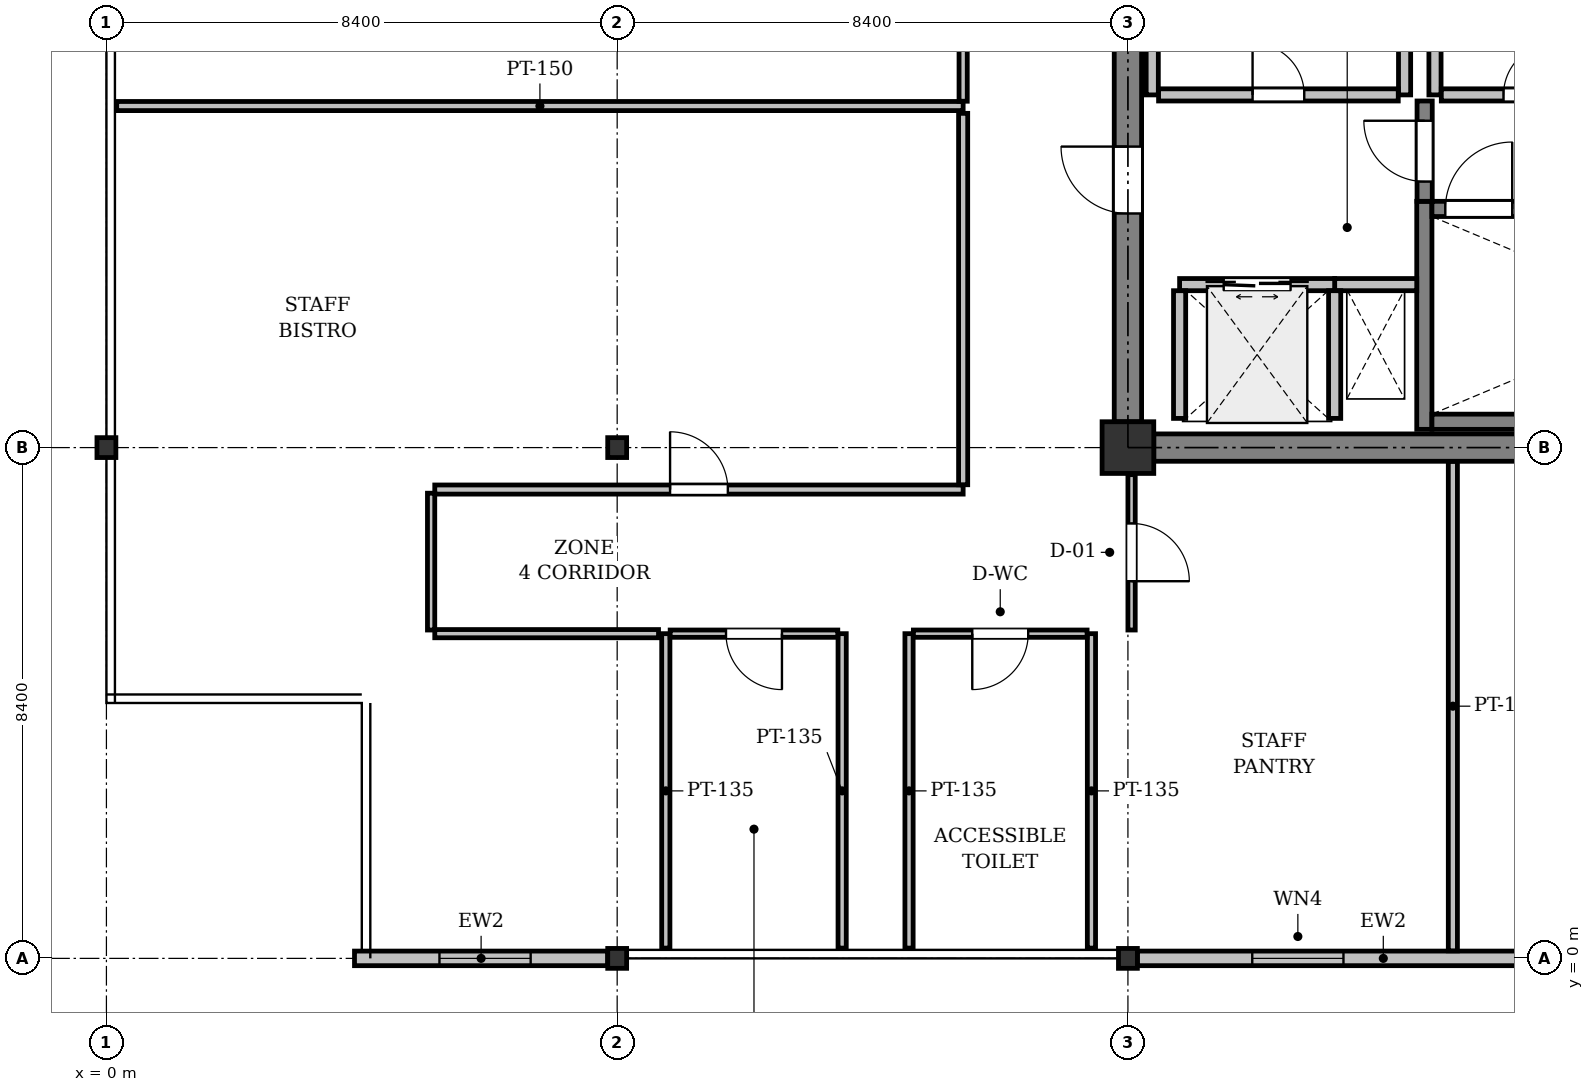
"""IFC4 building model, lengths in metres.
Left out: names, types, materials, properties, quantities, classifications, styles, units other than length and angle.
Written with IfcOpenShell. Run it as: python <this file> out.ifc"""

import sys

from ifc_helpers import new_model, si_unit, direction, frame, frame_2d, origin, origin_2d, place, context, subcontext, project, spatial, rectangle, i_section, extrude, element, fill, save


model = new_model("IFC4")
c1 = context("Model", 3, precision=1e-05, world=origin(), true_north=direction((0.0, 1.0)))
c2 = subcontext(c1, "Body", "Model", "MODEL_VIEW")
j1 = project(units=[si_unit("LENGTHUNIT", "METRE"), si_unit("PLANEANGLEUNIT", "RADIAN")], contexts=[c1])
p1 = place(None, origin())
s1 = spatial("IfcSite", under=j1, at=p1, CompositionType="ELEMENT")
p2 = place(p1, origin())
s2 = spatial("IfcBuilding", under=s1, at=p2, CompositionType="ELEMENT")
p3 = place(p2, frame((0.0, 0.0, 290.2)))
s3 = spatial("IfcBuildingStorey", under=s2, at=p3, CompositionType="ELEMENT", Elevation=290.2)
for number, where, z_axis, x_axis in (
    (1, (0.0, 8.4, 0.0), (0.0, 0.0, 1.0), (1.0, 0.0, 0.0)),
    (2, (8.4, 0.0, 0.0), (0.0, 0.0, 1.0), (1.0, 0.0, 0.0)),
    (3, (8.4, 8.4, 0.0), (0.0, 0.0, 1.0), (1.0, 0.0, 0.0)),
    (4, (16.8, 0.0, 0.0), (0.0, 0.0, 1.0), (1.0, 0.0, 0.0)),
):
    element("IfcColumn", number, at=place(p3, frame(where, z_axis=z_axis, x_axis=x_axis)), inside=s3, PredefinedType="COLUMN", context=c2, shape_type="SweptSolid", body=[
        extrude(i_section(OverallWidth=0.311, OverallDepth=0.327, WebThickness=0.016, FlangeThickness=0.025, FilletRadius=0.017, at=origin_2d()), origin(), (0.0, 0.0, 1.0), 4.0),
    ])
p4 = place(p3, frame((16.8, 8.4, 0.0), z_axis=(0.0, 0.0, 1.0), x_axis=(1.0, 0.0, 0.0)))
e5 = element("IfcColumn", 5, at=p4, inside=s3, PredefinedType="COLUMN", context=c2, shape_type="SweptSolid", body=[
    extrude(rectangle(XDim=0.85, YDim=0.85, at=origin_2d()), origin(), (0.0, 0.0, 1.0), 4.0),
])
p5 = place(p3, frame((25.044, 0.0, 0.0), z_axis=(0.0, 0.0, 1.0), x_axis=(-1.0, 0.0, 0.0)))
e6 = element("IfcWall", 6, at=p5, inside=s3, PredefinedType="STANDARD", context=c2, shape_type="SweptSolid", body=[
    extrude(rectangle(XDim=8.089, YDim=0.24, at=frame_2d((4.044, 0.0))), origin(), (0.0, 0.0, 1.0), 3.475),
])
p6 = place(p5, frame((4.7, 0.0, 0.9)))
e7 = element("IfcOpeningElement", 7, at=p6, cuts=e6, PredefinedType="OPENING", context=c2, shape_type="SweptSolid", body=[
    extrude(rectangle(XDim=1.5, YDim=1.6, at=frame_2d((0.75, 0.8))), frame((0.0, 0.13, 0.0), z_axis=(0.0, -1.0, 0.0), x_axis=(1.0, 0.0, 0.0)), (0.0, 0.0, 1.0), 0.26),
])
p7 = place(p3, frame((8.244, 0.0, 0.0), z_axis=(0.0, 0.0, 1.0), x_axis=(-1.0, 0.0, 0.0)))
e8 = element("IfcWall", 8, at=p7, inside=s3, PredefinedType="STANDARD", context=c2, shape_type="SweptSolid", body=[
    extrude(rectangle(XDim=4.164, YDim=0.24, at=frame_2d((2.082, 0.0))), origin(), (0.0, 0.0, 1.0), 3.725),
])
p8 = place(p7, frame((1.267, 0.0, 0.9)))
e9 = element("IfcOpeningElement", 9, at=p8, cuts=e8, PredefinedType="OPENING", context=c2, shape_type="SweptSolid", body=[
    extrude(rectangle(XDim=1.5, YDim=1.6, at=frame_2d((0.75, 0.8))), frame((0.0, 0.13, 0.0), z_axis=(0.0, -1.0, 0.0), x_axis=(1.0, 0.0, 0.0)), (0.0, 0.0, 1.0), 0.26),
])
p9 = place(p3, frame((17.225, 8.4, 0.0), z_axis=(0.0, 0.0, 1.0), x_axis=(1.0, 0.0, 0.0)))
e10 = element("IfcWall", 10, at=p9, inside=s3, PredefinedType="SHEAR", context=c2, shape_type="SweptSolid", body=[
    extrude(rectangle(XDim=7.55, YDim=0.45, at=frame_2d((3.775, 0.0))), origin(), (0.0, 0.0, 1.0), 3.725),
])
p10 = place(p3, frame((16.8, 8.825, 0.0), z_axis=(0.0, 0.0, 1.0), x_axis=(0.0, 1.0, 0.0)))
e11 = element("IfcWall", 11, at=p10, inside=s3, PredefinedType="SHEAR", context=c2, shape_type="SweptSolid", body=[
    extrude(rectangle(XDim=7.55, YDim=0.45, at=frame_2d((3.775, 0.0))), origin(), (0.0, 0.0, 1.0), 3.725),
])
p11 = place(p10, frame((3.425, 0.0, 0.0)))
e12 = element("IfcOpeningElement", 12, at=p11, cuts=e11, PredefinedType="OPENING", context=c2, shape_type="SweptSolid", body=[
    extrude(rectangle(XDim=1.1, YDim=2.15, at=frame_2d((0.55, 1.075))), frame((0.0, 0.235, 0.0), z_axis=(0.0, -1.0, 0.0), x_axis=(1.0, 0.0, 0.0)), (0.0, 0.0, 1.0), 0.47),
])
p12 = place(p3, frame((21.675, 8.7, 0.0), z_axis=(0.0, 0.0, 1.0), x_axis=(0.0, 1.0, 0.0)))
e13 = element("IfcWall", 13, at=p12, inside=s3, PredefinedType="SHEAR", context=c2, shape_type="SweptSolid", body=[
    extrude(rectangle(XDim=3.75, YDim=0.25, at=frame_2d((1.875, 0.0))), origin(), (0.0, 0.0, 1.0), 3.725),
])
p13 = place(p3, frame((21.8, 8.825, 0.0), z_axis=(0.0, 0.0, 1.0), x_axis=(1.0, 0.0, 0.0)))
e14 = element("IfcWall", 14, at=p13, inside=s3, PredefinedType="SHEAR", context=c2, shape_type="SweptSolid", body=[
    extrude(rectangle(XDim=7.75, YDim=0.25, at=frame_2d((3.875, 0.0))), origin(), (0.0, 0.0, 1.0), 3.725),
])
p14 = place(p3, frame((21.8, 12.325, 0.0), z_axis=(0.0, 0.0, 1.0), x_axis=(1.0, 0.0, 0.0)))
e15 = element("IfcWall", 15, at=p14, inside=s3, PredefinedType="SHEAR", context=c2, shape_type="SweptSolid", body=[
    extrude(rectangle(XDim=7.75, YDim=0.25, at=frame_2d((3.875, 0.0))), origin(), (0.0, 0.0, 1.0), 3.725),
])
p15 = place(p14, frame((0.22, 0.0, 0.0)))
e16 = element("IfcOpeningElement", 16, at=p15, cuts=e15, PredefinedType="OPENING", context=c2, shape_type="SweptSolid", body=[
    extrude(rectangle(XDim=1.1, YDim=2.15, at=frame_2d((0.55, 1.075))), frame((0.0, 0.135, 0.0), z_axis=(0.0, -1.0, 0.0), x_axis=(1.0, 0.0, 0.0)), (0.0, 0.0, 1.0), 0.27),
])
p16 = place(p3, frame((20.2, 11.08, 0.0), z_axis=(0.0, 0.0, 1.0), x_axis=(1.0, 0.0, 0.0)))
e17 = element("IfcWall", 17, at=p16, inside=s3, PredefinedType="PARTITIONING", context=c2, shape_type="SweptSolid", body=[
    extrude(rectangle(XDim=1.35, YDim=0.2, at=frame_2d((0.675, 0.0))), origin(), (0.0, 0.0, 1.0), 3.725),
])
p17 = place(p3, frame((21.68, 12.45, 0.0), z_axis=(0.0, 0.0, 1.0), x_axis=(0.0, 1.0, 0.0)))
e18 = element("IfcWall", 18, at=p17, inside=s3, PredefinedType="SHEAR", context=c2, shape_type="SweptSolid", body=[
    extrude(rectangle(XDim=1.65, YDim=0.25, at=frame_2d((0.825, 0.0))), origin(), (0.0, 0.0, 1.0), 3.725),
])
p18 = place(p17, frame((0.325, 0.0, 0.0)))
e19 = element("IfcOpeningElement", 19, at=p18, cuts=e18, PredefinedType="OPENING", context=c2, shape_type="SweptSolid", body=[
    extrude(rectangle(XDim=1.0, YDim=2.15, at=frame_2d((0.5, 1.075))), frame((0.0, 0.135, 0.0), z_axis=(0.0, -1.0, 0.0), x_axis=(1.0, 0.0, 0.0)), (0.0, 0.0, 1.0), 0.27),
])
p19 = place(p3, frame((17.65, 11.08, 0.0), z_axis=(0.0, 0.0, 1.0), x_axis=(1.0, 0.0, 0.0)))
e20 = element("IfcWall", 20, at=p19, inside=s3, PredefinedType="PARTITIONING", context=c2, shape_type="SweptSolid", body=[
    extrude(rectangle(XDim=2.55, YDim=0.2, at=frame_2d((1.275, 0.0))), origin(), (0.0, 0.0, 1.0), 3.725),
])
p20 = place(p19, frame((0.725, 0.0, 0.0)))
e21 = element("IfcOpeningElement", 21, at=p20, cuts=e20, PredefinedType="OPENING", context=c2, shape_type="SweptSolid", body=[
    extrude(rectangle(XDim=1.1, YDim=2.2, at=frame_2d((0.55, 1.1))), frame((0.0, 0.11, 0.0), z_axis=(0.0, -1.0, 0.0), x_axis=(1.0, 0.0, 0.0)), (0.0, 0.0, 1.0), 0.22),
])
for number, where, z_axis, x_axis in (
    (22, (20.2, 8.88, 0.0), (0.0, 0.0, 1.0), (0.0, 1.0, 0.0)),
    (23, (17.65, 8.88, 0.0), (0.0, 0.0, 1.0), (0.0, 1.0, 0.0)),
):
    element("IfcWall", number, at=place(p3, frame(where, z_axis=z_axis, x_axis=x_axis)), inside=s3, PredefinedType="PARTITIONING", context=c2, shape_type="SweptSolid", body=[
        extrude(rectangle(XDim=2.1, YDim=0.2, at=frame_2d((1.05, 0.0))), origin(), (0.0, 0.0, 1.0), 3.725),
    ])
p21 = place(p3, frame((21.35, 14.2, 0.0), z_axis=(0.0, 0.0, 1.0), x_axis=(0.0, 1.0, 0.0)))
e24 = element("IfcWall", 24, at=p21, inside=s3, PredefinedType="PARTITIONING", context=c2, shape_type="SweptSolid", body=[
    extrude(rectangle(XDim=2.25, YDim=0.2, at=frame_2d((1.125, 0.0))), origin(), (0.0, 0.0, 1.0), 3.725),
])
p22 = place(p3, frame((17.2, 16.37, 0.0), z_axis=(0.0, 0.0, 1.0), x_axis=(0.0, -1.0, 0.0)))
e25 = element("IfcWall", 25, at=p22, inside=s3, PredefinedType="PARTITIONING", context=c2, shape_type="SweptSolid", body=[
    extrude(rectangle(XDim=2.17, YDim=0.2, at=frame_2d((1.085, 0.0))), origin(), (0.0, 0.0, 1.0), 3.725),
])
p23 = place(p3, frame((17.304, 14.2, 0.0), z_axis=(0.0, 0.0, 1.0), x_axis=(1.0, 0.0, 0.0)))
e26 = element("IfcWall", 26, at=p23, inside=s3, PredefinedType="PARTITIONING", context=c2, shape_type="SweptSolid", body=[
    extrude(rectangle(XDim=3.942, YDim=0.2, at=frame_2d((1.971, 0.0))), origin(), (0.0, 0.0, 1.0), 3.725),
])
p24 = place(p23, frame((1.546, 0.0, 0.0)))
e27 = element("IfcOpeningElement", 27, at=p24, cuts=e26, PredefinedType="OPENING", context=c2, shape_type="SweptSolid", body=[
    extrude(rectangle(XDim=0.85, YDim=2.15, at=frame_2d((0.425, 1.075))), frame((0.0, 0.11, 0.0), z_axis=(0.0, -1.0, 0.0), x_axis=(1.0, 0.0, 0.0)), (0.0, 0.0, 1.0), 0.22),
])
p25 = place(p3, frame((21.85, 16.346, 0.0), z_axis=(0.0, 0.0, 1.0), x_axis=(0.0, -1.0, 0.0)))
e28 = element("IfcWall", 28, at=p25, inside=s3, PredefinedType="PARTITIONING", context=c2, shape_type="SweptSolid", body=[
    extrude(rectangle(XDim=2.146, YDim=0.2, at=frame_2d((1.073, 0.0))), origin(), (0.0, 0.0, 1.0), 3.725),
])
p26 = place(p3, frame((21.954, 14.2, 0.0), z_axis=(0.0, 0.0, 1.0), x_axis=(1.0, 0.0, 0.0)))
e29 = element("IfcWall", 29, at=p26, inside=s3, PredefinedType="PARTITIONING", context=c2, shape_type="SweptSolid", body=[
    extrude(rectangle(XDim=2.896, YDim=0.2, at=frame_2d((1.448, 0.0))), origin(), (0.0, 0.0, 1.0), 3.725),
])
p27 = place(p26, frame((1.023, 0.0, 0.0)))
e30 = element("IfcOpeningElement", 30, at=p27, cuts=e29, PredefinedType="OPENING", context=c2, shape_type="SweptSolid", body=[
    extrude(rectangle(XDim=0.85, YDim=2.15, at=frame_2d((0.425, 1.075))), frame((0.0, 0.11, 0.0), z_axis=(0.0, -1.0, 0.0), x_axis=(1.0, 0.0, 0.0)), (0.0, 0.0, 1.0), 0.22),
])
for number, where, z_axis, x_axis in (
    (31, (13.2, 5.34, 0.0), (0.0, 0.0, 1.0), (0.0, -1.0, 0.0)),
    (32, (16.2, 0.169, 0.0), (0.0, 0.0, 1.0), (0.0, 1.0, 0.0)),
):
    element("IfcWall", number, at=place(p3, frame(where, z_axis=z_axis, x_axis=x_axis)), inside=s3, PredefinedType="PARTITIONING", context=c2, shape_type="SweptSolid", body=[
        extrude(rectangle(XDim=5.171, YDim=0.135, at=frame_2d((2.585, 0.0))), origin(), (0.0, 0.0, 1.0), 3.725),
    ])
p28 = place(p3, frame((16.128, 5.34, 0.0), z_axis=(0.0, 0.0, 1.0), x_axis=(-1.0, 0.0, 0.0)))
e33 = element("IfcWall", 33, at=p28, inside=s3, PredefinedType="PARTITIONING", context=c2, shape_type="SweptSolid", body=[
    extrude(rectangle(XDim=2.857, YDim=0.12, at=frame_2d((1.428, 0.0))), origin(), (0.0, 0.0, 1.0), 3.725),
])
p29 = place(p28, frame((0.969, 0.0, 0.0)))
e34 = element("IfcOpeningElement", 34, at=p29, cuts=e33, PredefinedType="OPENING", context=c2, shape_type="SweptSolid", body=[
    extrude(rectangle(XDim=0.92, YDim=2.1, at=frame_2d((0.46, 1.05))), frame((0.0, 0.07, 0.0), z_axis=(0.0, -1.0, 0.0), x_axis=(1.0, 0.0, 0.0)), (0.0, 0.0, 1.0), 0.14),
])
for number, where, z_axis, x_axis in (
    (35, (9.2, 5.34, 0.0), (0.0, 0.0, 1.0), (0.0, -1.0, 0.0)),
    (36, (12.1, 0.169, 0.0), (0.0, 0.0, 1.0), (0.0, 1.0, 0.0)),
):
    element("IfcWall", number, at=place(p3, frame(where, z_axis=z_axis, x_axis=x_axis)), inside=s3, PredefinedType="PARTITIONING", context=c2, shape_type="SweptSolid", body=[
        extrude(rectangle(XDim=5.171, YDim=0.135, at=frame_2d((2.585, 0.0))), origin(), (0.0, 0.0, 1.0), 3.725),
    ])
p30 = place(p3, frame((12.029, 5.34, 0.0), z_axis=(0.0, 0.0, 1.0), x_axis=(-1.0, 0.0, 0.0)))
e37 = element("IfcWall", 37, at=p30, inside=s3, PredefinedType="PARTITIONING", context=c2, shape_type="SweptSolid", body=[
    extrude(rectangle(XDim=2.757, YDim=0.12, at=frame_2d((1.378, 0.0))), origin(), (0.0, 0.0, 1.0), 3.725),
])
p31 = place(p30, frame((0.918, 0.0, 0.0)))
e38 = element("IfcOpeningElement", 38, at=p31, cuts=e37, PredefinedType="OPENING", context=c2, shape_type="SweptSolid", body=[
    extrude(rectangle(XDim=0.92, YDim=2.1, at=frame_2d((0.46, 1.05))), frame((0.0, 0.07, 0.0), z_axis=(0.0, -1.0, 0.0), x_axis=(1.0, 0.0, 0.0)), (0.0, 0.0, 1.0), 0.14),
])
p32 = place(p3, frame((22.144, 0.124, 0.0), z_axis=(0.0, 0.0, 1.0), x_axis=(0.0, 1.0, 0.0)))
e39 = element("IfcWall", 39, at=p32, inside=s3, PredefinedType="PARTITIONING", context=c2, shape_type="SweptSolid", body=[
    extrude(rectangle(XDim=8.047, YDim=0.15, at=frame_2d((4.023, 0.0))), origin(), (0.0, 0.0, 1.0), 3.725),
])
p33 = place(p3, frame((16.86, 7.955, 0.0), z_axis=(0.0, 0.0, 1.0), x_axis=(0.0, -1.0, 0.0)))
e40 = element("IfcWall", 40, at=p33, inside=s3, PredefinedType="PARTITIONING", context=c2, shape_type="SweptSolid", body=[
    extrude(rectangle(XDim=2.555, YDim=0.12, at=frame_2d((1.278, 0.0))), origin(), (0.0, 0.0, 1.0), 3.319),
])
p34 = place(p33, frame((0.802, 0.0, 0.0)))
e41 = element("IfcOpeningElement", 41, at=p34, cuts=e40, PredefinedType="OPENING", context=c2, shape_type="SweptSolid", body=[
    extrude(rectangle(XDim=0.95, YDim=2.15, at=frame_2d((0.475, 1.075))), frame((0.0, 0.07, 0.0), z_axis=(0.0, -1.0, 0.0), x_axis=(1.0, 0.0, 0.0)), (0.0, 0.0, 1.0), 0.14),
])
p35 = place(p3, frame((0.169, 14.017, 0.0), z_axis=(0.0, 0.0, 1.0), x_axis=(1.0, 0.0, 0.0)))
e42 = element("IfcWall", 42, at=p35, inside=s3, PredefinedType="PARTITIONING", context=c2, shape_type="SweptSolid", body=[
    extrude(rectangle(XDim=13.921, YDim=0.15, at=frame_2d((6.96, 0.0))), origin(), (0.0, 0.0, 1.0), 3.319),
])
p36 = place(p3, frame((14.09, 14.096, 0.0), z_axis=(0.0, 0.0, 1.0), x_axis=(0.0, 1.0, 0.0)))
e43 = element("IfcWall", 43, at=p36, inside=s3, PredefinedType="PARTITIONING", context=c2, shape_type="SweptSolid", body=[
    extrude(rectangle(XDim=4.303, YDim=0.135, at=frame_2d((2.152, 0.0))), origin(), (0.0, 0.0, 1.0), 3.271),
])
p37 = place(p36, frame((1.677, 0.0, 0.0)))
e44 = element("IfcOpeningElement", 44, at=p37, cuts=e43, PredefinedType="OPENING", context=c2, shape_type="SweptSolid", body=[
    extrude(rectangle(XDim=0.95, YDim=2.15, at=frame_2d((0.475, 1.075))), frame((0.0, 0.077, 0.0), z_axis=(0.0, -1.0, 0.0), x_axis=(1.0, 0.0, 0.0)), (0.0, 0.0, 1.0), 0.155),
])
p38 = place(p3, frame((5.4, 7.71, 0.0), z_axis=(0.0, 0.0, 1.0), x_axis=(1.0, 0.0, 0.0)))
e45 = element("IfcWall", 45, at=p38, inside=s3, PredefinedType="PARTITIONING", context=c2, shape_type="SweptSolid", body=[
    extrude(rectangle(XDim=8.69, YDim=0.15, at=frame_2d((4.345, 0.0))), origin(), (0.0, 0.0, 1.0), 3.319),
])
p39 = place(p38, frame((3.87, 0.0, 0.0)))
e46 = element("IfcOpeningElement", 46, at=p39, cuts=e45, PredefinedType="OPENING", context=c2, shape_type="SweptSolid", body=[
    extrude(rectangle(XDim=0.95, YDim=2.15, at=frame_2d((0.475, 1.075))), frame((0.0, 0.085, 0.0), z_axis=(0.0, -1.0, 0.0), x_axis=(1.0, 0.0, 0.0)), (0.0, 0.0, 1.0), 0.17),
])
p40 = place(p3, frame((14.09, 7.789, 0.0), z_axis=(0.0, 0.0, 1.0), x_axis=(0.0, 1.0, 0.0)))
e47 = element("IfcWall", 47, at=p40, inside=s3, PredefinedType="PARTITIONING", context=c2, shape_type="SweptSolid", body=[
    extrude(rectangle(XDim=6.108, YDim=0.15, at=frame_2d((3.054, 0.0))), origin(), (0.0, 0.0, 1.0), 3.271),
])
p41 = place(p3, frame((9.08, 5.34, 0.0), z_axis=(0.0, 0.0, 1.0), x_axis=(-1.0, 0.0, 0.0)))
e48 = element("IfcWall", 48, at=p41, inside=s3, PredefinedType="PARTITIONING", context=c2, shape_type="SweptSolid", body=[
    extrude(rectangle(XDim=3.68, YDim=0.135, at=frame_2d((1.84, 0.0))), origin(), (0.0, 0.0, 1.0), 3.319),
])
p42 = place(p3, frame((5.34, 5.4, 0.0), z_axis=(0.0, 0.0, 1.0), x_axis=(0.0, 1.0, 0.0)))
e49 = element("IfcWall", 49, at=p42, inside=s3, PredefinedType="PARTITIONING", context=c2, shape_type="SweptSolid", body=[
    extrude(rectangle(XDim=2.25, YDim=0.12, at=frame_2d((1.125, 0.0))), origin(), (0.0, 0.0, 1.0), 3.725),
])
p43 = place(p6, origin())
e50 = element("IfcWindow", 50, at=p43, inside=s3, PartitioningType="SINGLE_PANEL", PredefinedType="WINDOW", context=c2, shape_type="SweptSolid", body=[
    extrude(rectangle(XDim=1.5, YDim=1.6, at=frame_2d((0.75, 0.8))), frame((0.0, 0.03, 0.0), z_axis=(0.0, -1.0, 0.0), x_axis=(1.0, 0.0, 0.0)), (0.0, 0.0, 1.0), 0.06),
])
fill(e7, e50)
p44 = place(p8, origin())
e51 = element("IfcWindow", 51, at=p44, inside=s3, PartitioningType="SINGLE_PANEL", PredefinedType="WINDOW", context=c2, shape_type="SweptSolid", body=[
    extrude(rectangle(XDim=1.5, YDim=1.6, at=frame_2d((0.75, 0.8))), frame((0.0, 0.03, 0.0), z_axis=(0.0, -1.0, 0.0), x_axis=(1.0, 0.0, 0.0)), (0.0, 0.0, 1.0), 0.06),
])
fill(e9, e51)
p45 = place(p11, origin())
e52 = element("IfcDoor", 52, at=p45, inside=s3, OperationType="SINGLE_SWING_RIGHT", PredefinedType="DOOR", context=c2, shape_type="SweptSolid", body=[
    extrude(rectangle(XDim=1.1, YDim=2.15, at=frame_2d((0.55, 1.075))), frame((0.0, 0.025, 0.0), z_axis=(0.0, -1.0, 0.0), x_axis=(1.0, 0.0, 0.0)), (0.0, 0.0, 1.0), 0.05),
])
fill(e12, e52)
p46 = place(p15, origin())
e53 = element("IfcDoor", 53, at=p46, inside=s3, OperationType="SINGLE_SWING_RIGHT", PredefinedType="DOOR", context=c2, shape_type="SweptSolid", body=[
    extrude(rectangle(XDim=1.1, YDim=2.15, at=frame_2d((0.55, 1.075))), frame((0.0, 0.025, 0.0), z_axis=(0.0, -1.0, 0.0), x_axis=(1.0, 0.0, 0.0)), (0.0, 0.0, 1.0), 0.05),
])
fill(e16, e53)
p47 = place(p18, origin())
e54 = element("IfcDoor", 54, at=p47, inside=s3, OperationType="SINGLE_SWING_RIGHT", PredefinedType="DOOR", context=c2, shape_type="SweptSolid", body=[
    extrude(rectangle(XDim=1.0, YDim=2.15, at=frame_2d((0.5, 1.075))), frame((0.0, 0.025, 0.0), z_axis=(0.0, -1.0, 0.0), x_axis=(1.0, 0.0, 0.0)), (0.0, 0.0, 1.0), 0.05),
])
fill(e19, e54)
p48 = place(p20, origin())
e55 = element("IfcDoor", 55, at=p48, inside=s3, OperationType="DOUBLE_DOOR_SLIDING", PredefinedType="DOOR", context=c2, shape_type="SweptSolid", body=[
    extrude(rectangle(XDim=1.1, YDim=2.2, at=frame_2d((0.55, 1.1))), frame((0.0, 0.025, 0.0), z_axis=(0.0, -1.0, 0.0), x_axis=(1.0, 0.0, 0.0)), (0.0, 0.0, 1.0), 0.05),
])
fill(e21, e55)
p49 = place(p24, origin())
e56 = element("IfcDoor", 56, at=p49, inside=s3, OperationType="SINGLE_SWING_LEFT", PredefinedType="DOOR", context=c2, shape_type="SweptSolid", body=[
    extrude(rectangle(XDim=0.85, YDim=2.15, at=frame_2d((0.425, 1.075))), frame((0.0, 0.025, 0.0), z_axis=(0.0, -1.0, 0.0), x_axis=(1.0, 0.0, 0.0)), (0.0, 0.0, 1.0), 0.05),
])
fill(e27, e56)
p50 = place(p27, origin())
e57 = element("IfcDoor", 57, at=p50, inside=s3, OperationType="SINGLE_SWING_RIGHT", PredefinedType="DOOR", context=c2, shape_type="SweptSolid", body=[
    extrude(rectangle(XDim=0.85, YDim=2.15, at=frame_2d((0.425, 1.075))), frame((0.0, 0.025, 0.0), z_axis=(0.0, -1.0, 0.0), x_axis=(1.0, 0.0, 0.0)), (0.0, 0.0, 1.0), 0.05),
])
fill(e30, e57)
p51 = place(p29, origin())
e58 = element("IfcDoor", 58, at=p51, inside=s3, OperationType="SINGLE_SWING_RIGHT", PredefinedType="DOOR", context=c2, shape_type="SweptSolid", body=[
    extrude(rectangle(XDim=0.92, YDim=2.1, at=frame_2d((0.46, 1.05))), frame((0.0, 0.025, 0.0), z_axis=(0.0, -1.0, 0.0), x_axis=(1.0, 0.0, 0.0)), (0.0, 0.0, 1.0), 0.05),
])
fill(e34, e58)
p52 = place(p31, origin())
e59 = element("IfcDoor", 59, at=p52, inside=s3, OperationType="SINGLE_SWING_LEFT", PredefinedType="DOOR", context=c2, shape_type="SweptSolid", body=[
    extrude(rectangle(XDim=0.92, YDim=2.1, at=frame_2d((0.46, 1.05))), frame((0.0, 0.025, 0.0), z_axis=(0.0, -1.0, 0.0), x_axis=(1.0, 0.0, 0.0)), (0.0, 0.0, 1.0), 0.05),
])
fill(e38, e59)
p53 = place(p34, origin())
e60 = element("IfcDoor", 60, at=p53, inside=s3, OperationType="SINGLE_SWING_RIGHT", PredefinedType="DOOR", context=c2, shape_type="SweptSolid", body=[
    extrude(rectangle(XDim=0.95, YDim=2.15, at=frame_2d((0.475, 1.075))), frame((0.0, 0.025, 0.0), z_axis=(0.0, -1.0, 0.0), x_axis=(1.0, 0.0, 0.0)), (0.0, 0.0, 1.0), 0.05),
])
fill(e41, e60)
p54 = place(p39, origin())
e61 = element("IfcDoor", 61, at=p54, inside=s3, OperationType="SINGLE_SWING_LEFT", PredefinedType="DOOR", context=c2, shape_type="SweptSolid", body=[
    extrude(rectangle(XDim=0.95, YDim=2.15, at=frame_2d((0.475, 1.075))), frame((0.0, 0.025, 0.0), z_axis=(0.0, -1.0, 0.0), x_axis=(1.0, 0.0, 0.0)), (0.0, 0.0, 1.0), 0.05),
])
fill(e46, e61)
save(model, sys.argv[1])
